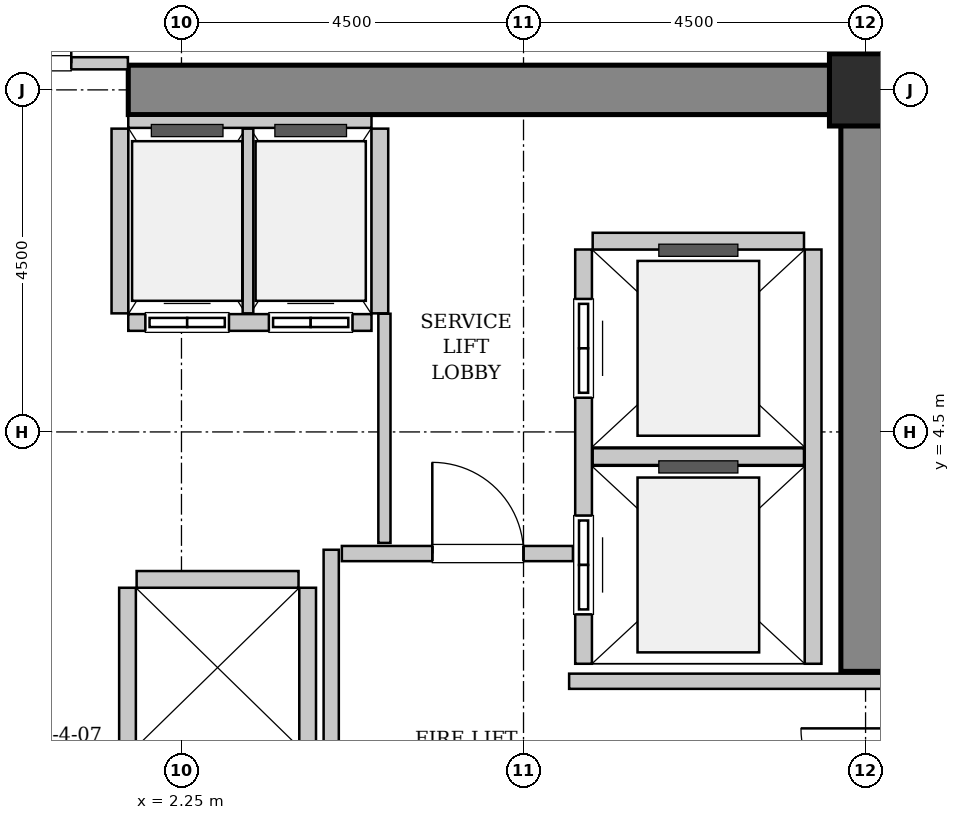
"""IFC4 building model, lengths in metres.
Left out: names, types, materials, properties, quantities, classifications, styles, units other than length and angle.
Written with IfcOpenShell. Run it as: python <this file> out.ifc"""

import sys

from ifc_helpers import new_model, si_unit, direction, frame, frame_2d, origin, origin_2d, place, context, subcontext, project, spatial, rectangle, hollow_rectangle, extrude, source, transform, mapped, element, fill, save


model = new_model("IFC4")
c1 = context("Model", 3, precision=1e-05, world=origin(), true_north=direction((0.0, 1.0)))
c2 = subcontext(c1, "Body", "Model", "MODEL_VIEW")
j1 = project(units=[si_unit("LENGTHUNIT", "METRE"), si_unit("PLANEANGLEUNIT", "RADIAN")], contexts=[c1])
p1 = place(None, origin())
s1 = spatial("IfcSite", under=j1, at=p1, CompositionType="ELEMENT")
p2 = place(p1, origin())
s2 = spatial("IfcBuilding", under=s1, at=p2, CompositionType="ELEMENT")
p3 = place(p2, frame((0.0, 0.0, 59.6)))
s3 = spatial("IfcBuildingStorey", under=s2, at=p3, CompositionType="ELEMENT", Elevation=59.6)
m1 = source(origin(), c2, "Body", "SweptSolid", [
    extrude(rectangle(XDim=10.025, YDim=0.65, at=frame_2d((5.012, 0.0))), origin(), (0.0, 0.0, 1.0), 3.8),
])
p4 = place(p3, frame((1.55, 9.0, 0.0), z_axis=(0.0, 0.0, 1.0), x_axis=(1.0, 0.0, 0.0)))
e1 = element("IfcWall", 1, at=p4, inside=s3, PredefinedType="SHEAR", context=c2, shape_type="MappedRepresentation", body=[
    mapped(m1, transform((0.0, 0.0, 0.0), x_axis=(1.0, 0.0, 0.0), y_axis=(0.0, 1.0, 0.0), z_axis=(0.0, 0.0, 1.0), scale=1.0)),
])
m2 = source(origin(), c2, "Body", "SweptSolid", [
    extrude(rectangle(XDim=7.325, YDim=0.65, at=frame_2d((3.663, 0.0))), origin(), (0.0, 0.0, 1.0), 3.8),
])
p5 = place(p3, frame((11.25, 1.35, 0.0), z_axis=(0.0, 0.0, 1.0), x_axis=(0.0, 1.0, 0.0)))
e2 = element("IfcWall", 2, at=p5, inside=s3, PredefinedType="SHEAR", context=c2, shape_type="MappedRepresentation", body=[
    mapped(m2, transform((0.0, 0.0, 0.0), x_axis=(1.0, 0.0, 0.0), y_axis=(0.0, 1.0, 0.0), z_axis=(0.0, 0.0, 1.0), scale=1.0)),
])
m3 = source(origin(), c2, "Body", "SweptSolid", [
    extrude(hollow_rectangle(XDim=0.95, YDim=0.95, WallThickness=0.045, InnerFilletRadius=0.045, OuterFilletRadius=0.09, at=origin_2d()), origin(), (0.0, 0.0, 1.0), 3.8),
])
p6 = place(p3, frame((11.25, 9.0, 0.0), z_axis=(0.0, 0.0, 1.0), x_axis=(1.0, 0.0, 0.0)))
e3 = element("IfcColumn", 3, at=p6, inside=s3, PredefinedType="COLUMN", context=c2, shape_type="MappedRepresentation", body=[
    mapped(m3, transform((0.0, 0.0, 0.0), x_axis=(1.0, 0.0, 0.0), y_axis=(0.0, 1.0, 0.0), z_axis=(0.0, 0.0, 1.0), scale=1.0)),
])
m4 = source(origin(), c2, "Body", "SweptSolid", [
    extrude(rectangle(XDim=5.45, YDim=0.22, at=frame_2d((2.725, 0.0))), origin(), (0.0, 0.0, 1.0), 3.535),
])
p7 = place(p3, frame((7.54, 6.9, 0.0), z_axis=(0.0, 0.0, 1.0), x_axis=(0.0, -1.0, 0.0)))
e4 = element("IfcWall", 4, at=p7, inside=s3, PredefinedType="SOLIDWALL", context=c2, shape_type="MappedRepresentation", body=[
    mapped(m4, transform((0.0, 0.0, 0.0), x_axis=(1.0, 0.0, 0.0), y_axis=(0.0, 1.0, 0.0), z_axis=(0.0, 0.0, 1.0), scale=1.0)),
])
p8 = place(p7, frame((3.5, 0.0, 0.0)))
e5 = element("IfcOpeningElement", 5, at=p8, cuts=e4, PredefinedType="OPENING", context=c2, shape_type="SweptSolid", body=[
    extrude(rectangle(XDim=1.3, YDim=2.3, at=frame_2d((0.65, 1.15))), frame((0.0, 0.12, 0.0), z_axis=(0.0, -1.0, 0.0), x_axis=(1.0, 0.0, 0.0)), (0.0, 0.0, 1.0), 0.24),
])
p9 = place(p7, frame((0.65, 0.0, 0.0)))
e6 = element("IfcOpeningElement", 6, at=p9, cuts=e4, PredefinedType="OPENING", context=c2, shape_type="SweptSolid", body=[
    extrude(rectangle(XDim=1.3, YDim=2.3, at=frame_2d((0.65, 1.15))), frame((0.0, 0.12, 0.0), z_axis=(0.0, -1.0, 0.0), x_axis=(1.0, 0.0, 0.0)), (0.0, 0.0, 1.0), 0.24),
])
p10 = place(p3, frame((10.56, 1.45, 0.0), z_axis=(0.0, 0.0, 1.0), x_axis=(0.0, 1.0, 0.0)))
e7 = element("IfcWall", 7, at=p10, inside=s3, PredefinedType="SOLIDWALL", context=c2, shape_type="MappedRepresentation", body=[
    mapped(m4, transform((0.0, 0.0, 0.0), x_axis=(1.0, 0.0, 0.0), y_axis=(0.0, 1.0, 0.0), z_axis=(0.0, 0.0, 1.0), scale=1.0)),
])
m5 = source(origin(), c2, "Body", "SweptSolid", [
    extrude(rectangle(XDim=2.78, YDim=0.22, at=frame_2d((1.39, 0.0))), origin(), (0.0, 0.0, 1.0), 3.535),
])
for number, where, z_axis, x_axis in (
    (8, (7.66, 4.175, 0.0), (0.0, 0.0, 1.0), (1.0, 0.0, 0.0)),
    (9, (10.44, 7.01, 0.0), (0.0, 0.0, 1.0), (-1.0, 0.0, 0.0)),
):
    element("IfcWall", number, at=place(p3, frame(where, z_axis=z_axis, x_axis=x_axis)), inside=s3, PredefinedType="SOLIDWALL", context=c2, shape_type="MappedRepresentation", body=[
        mapped(m5, transform((0.0, 0.0, 0.0), x_axis=(1.0, 0.0, 0.0), y_axis=(0.0, 1.0, 0.0), z_axis=(0.0, 0.0, 1.0), scale=1.0)),
    ])
m6 = source(origin(), c2, "Body", "SweptSolid", [
    extrude(rectangle(XDim=3.2, YDim=0.22, at=frame_2d((1.6, 0.0))), origin(), (0.0, 0.0, 1.0), 3.535),
])
p11 = place(p3, frame((1.55, 5.94, 0.0), z_axis=(0.0, 0.0, 1.0), x_axis=(1.0, 0.0, 0.0)))
e10 = element("IfcWall", 10, at=p11, inside=s3, PredefinedType="SOLIDWALL", context=c2, shape_type="MappedRepresentation", body=[
    mapped(m6, transform((0.0, 0.0, 0.0), x_axis=(1.0, 0.0, 0.0), y_axis=(0.0, 1.0, 0.0), z_axis=(0.0, 0.0, 1.0), scale=1.0)),
])
p12 = place(p11, frame((0.225, 0.0, 0.0)))
e11 = element("IfcOpeningElement", 11, at=p12, cuts=e10, PredefinedType="OPENING", context=c2, shape_type="SweptSolid", body=[
    extrude(rectangle(XDim=1.1, YDim=2.2, at=frame_2d((0.55, 1.1))), frame((0.0, 0.12, 0.0), z_axis=(0.0, -1.0, 0.0), x_axis=(1.0, 0.0, 0.0)), (0.0, 0.0, 1.0), 0.24),
])
p13 = place(p11, frame((1.85, 0.0, 0.0)))
e12 = element("IfcOpeningElement", 12, at=p13, cuts=e10, PredefinedType="OPENING", context=c2, shape_type="SweptSolid", body=[
    extrude(rectangle(XDim=1.1, YDim=2.2, at=frame_2d((0.55, 1.1))), frame((0.0, 0.12, 0.0), z_axis=(0.0, -1.0, 0.0), x_axis=(1.0, 0.0, 0.0)), (0.0, 0.0, 1.0), 0.24),
])
m7 = source(origin(), c2, "Body", "SweptSolid", [
    extrude(rectangle(XDim=3.2, YDim=0.16, at=frame_2d((1.6, 0.0))), origin(), (0.0, 0.0, 1.0), 2.425),
])
p14 = place(p3, frame((4.75, 8.58, 0.0), z_axis=(0.0, 0.0, 1.0), x_axis=(-1.0, 0.0, 0.0)))
e13 = element("IfcWall", 13, at=p14, inside=s3, PredefinedType="PARTITIONING", context=c2, shape_type="MappedRepresentation", body=[
    mapped(m7, transform((0.0, 0.0, 0.0), x_axis=(1.0, 0.0, 0.0), y_axis=(0.0, 1.0, 0.0), z_axis=(0.0, 0.0, 1.0), scale=1.0)),
])
m8 = source(origin(), c2, "Body", "SweptSolid", [
    extrude(rectangle(XDim=2.43, YDim=0.22, at=frame_2d((1.215, 0.0))), origin(), (0.0, 0.0, 1.0), 3.535),
])
p15 = place(p3, frame((1.44, 8.49, 0.0), z_axis=(0.0, 0.0, 1.0), x_axis=(0.0, -1.0, 0.0)))
e14 = element("IfcWall", 14, at=p15, inside=s3, PredefinedType="SOLIDWALL", context=c2, shape_type="MappedRepresentation", body=[
    mapped(m8, transform((0.0, 0.0, 0.0), x_axis=(1.0, 0.0, 0.0), y_axis=(0.0, 1.0, 0.0), z_axis=(0.0, 0.0, 1.0), scale=1.0)),
])
m9 = source(origin(), c2, "Body", "SweptSolid", [
    extrude(rectangle(XDim=2.43, YDim=0.14, at=frame_2d((1.215, 0.0))), origin(), (0.0, 0.0, 1.0), 3.535),
])
p16 = place(p3, frame((3.125, 6.06, 0.0), z_axis=(0.0, 0.0, 1.0), x_axis=(0.0, 1.0, 0.0)))
e15 = element("IfcWall", 15, at=p16, inside=s3, PredefinedType="PARTITIONING", context=c2, shape_type="MappedRepresentation", body=[
    mapped(m9, transform((0.0, 0.0, 0.0), x_axis=(1.0, 0.0, 0.0), y_axis=(0.0, 1.0, 0.0), z_axis=(0.0, 0.0, 1.0), scale=1.0)),
])
p17 = place(p3, frame((4.86, 6.06, 0.0), z_axis=(0.0, 0.0, 1.0), x_axis=(0.0, 1.0, 0.0)))
e16 = element("IfcWall", 16, at=p17, inside=s3, PredefinedType="SOLIDWALL", context=c2, shape_type="MappedRepresentation", body=[
    mapped(m8, transform((0.0, 0.0, 0.0), x_axis=(1.0, 0.0, 0.0), y_axis=(0.0, 1.0, 0.0), z_axis=(0.0, 0.0, 1.0), scale=1.0)),
])
m10 = source(origin(), c2, "Body", "SweptSolid", [
    extrude(rectangle(XDim=4.9, YDim=0.22, at=frame_2d((2.45, 0.0))), origin(), (0.0, 0.0, 1.0), 3.535),
])
for number, where, z_axis, x_axis in (
    (17, (1.54, 2.45, 0.0), (0.0, 0.0, 1.0), (0.0, -1.0, 0.0)),
    (18, (3.91, -2.45, 0.0), (0.0, 0.0, 1.0), (0.0, 1.0, 0.0)),
):
    element("IfcWall", number, at=place(p3, frame(where, z_axis=z_axis, x_axis=x_axis)), inside=s3, PredefinedType="SOLIDWALL", context=c2, shape_type="MappedRepresentation", body=[
        mapped(m10, transform((0.0, 0.0, 0.0), x_axis=(1.0, 0.0, 0.0), y_axis=(0.0, 1.0, 0.0), z_axis=(0.0, 0.0, 1.0), scale=1.0)),
    ])
m11 = source(origin(), c2, "Body", "SweptSolid", [
    extrude(rectangle(XDim=2.13, YDim=0.22, at=frame_2d((1.065, 0.0))), origin(), (0.0, 0.0, 1.0), 3.535),
])
p18 = place(p3, frame((3.79, 2.56, 0.0), z_axis=(0.0, 0.0, 1.0), x_axis=(-1.0, 0.0, 0.0)))
e19 = element("IfcWall", 19, at=p18, inside=s3, PredefinedType="SOLIDWALL", context=c2, shape_type="MappedRepresentation", body=[
    mapped(m11, transform((0.0, 0.0, 0.0), x_axis=(1.0, 0.0, 0.0), y_axis=(0.0, 1.0, 0.0), z_axis=(0.0, 0.0, 1.0), scale=1.0)),
])
m12 = source(origin(), c2, "Body", "SweptSolid", [
    extrude(rectangle(XDim=5.9, YDim=0.2, at=frame_2d((2.95, 0.0))), origin(), (0.0, 0.0, 1.0), 3.535),
])
p19 = place(p3, frame((4.22, -2.95, 0.0), z_axis=(0.0, 0.0, 1.0), x_axis=(0.0, 1.0, 0.0)))
e20 = element("IfcWall", 20, at=p19, inside=s3, PredefinedType="PARTITIONING", context=c2, shape_type="MappedRepresentation", body=[
    mapped(m12, transform((0.0, 0.0, 0.0), x_axis=(1.0, 0.0, 0.0), y_axis=(0.0, 1.0, 0.0), z_axis=(0.0, 0.0, 1.0), scale=1.0)),
])
m13 = source(origin(), c2, "Body", "SweptSolid", [
    extrude(rectangle(XDim=3.04, YDim=0.2, at=frame_2d((1.52, 0.0))), origin(), (0.0, 0.0, 1.0), 3.535),
])
p20 = place(p3, frame((4.36, 2.9, 0.0), z_axis=(0.0, 0.0, 1.0), x_axis=(1.0, 0.0, 0.0)))
e21 = element("IfcWall", 21, at=p20, inside=s3, PredefinedType="PARTITIONING", context=c2, shape_type="MappedRepresentation", body=[
    mapped(m13, transform((0.0, 0.0, 0.0), x_axis=(1.0, 0.0, 0.0), y_axis=(0.0, 1.0, 0.0), z_axis=(0.0, 0.0, 1.0), scale=1.0)),
])
p21 = place(p20, frame((1.19, 0.0, 0.0)))
e22 = element("IfcOpeningElement", 22, at=p21, cuts=e21, PredefinedType="OPENING", context=c2, shape_type="SweptSolid", body=[
    extrude(rectangle(XDim=1.2, YDim=2.15, at=frame_2d((0.6, 1.075))), frame((0.0, 0.11, 0.0), z_axis=(0.0, -1.0, 0.0), x_axis=(1.0, 0.0, 0.0)), (0.0, 0.0, 1.0), 0.22),
])
m14 = source(origin(), c2, "Body", "SweptSolid", [
    extrude(rectangle(XDim=4.11, YDim=0.2, at=frame_2d((2.055, 0.0))), origin(), (0.0, 0.0, 1.0), 3.535),
])
p22 = place(p3, frame((7.35, 1.22, 0.0), z_axis=(0.0, 0.0, 1.0), x_axis=(1.0, 0.0, 0.0)))
e23 = element("IfcWall", 23, at=p22, inside=s3, PredefinedType="PARTITIONING", context=c2, shape_type="MappedRepresentation", body=[
    mapped(m14, transform((0.0, 0.0, 0.0), x_axis=(1.0, 0.0, 0.0), y_axis=(0.0, 1.0, 0.0), z_axis=(0.0, 0.0, 1.0), scale=1.0)),
])
m15 = source(origin(), c2, "Body", "SweptSolid", [
    extrude(rectangle(XDim=3.09, YDim=0.16, at=frame_2d((1.545, 0.0))), origin(), (0.0, 0.0, 1.0), 2.425),
])
p23 = place(p3, frame((-1.545, 9.35, 0.0), z_axis=(0.0, 0.0, 1.0), x_axis=(1.0, 0.0, 0.0)))
e24 = element("IfcWall", 24, at=p23, inside=s3, PredefinedType="PARTITIONING", context=c2, shape_type="MappedRepresentation", body=[
    mapped(m15, transform((0.0, 0.0, 0.0), x_axis=(1.0, 0.0, 0.0), y_axis=(0.0, 1.0, 0.0), z_axis=(0.0, 0.0, 1.0), scale=1.0)),
])
p24 = place(p23, frame((0.745, 0.0, 0.0)))
e25 = element("IfcOpeningElement", 25, at=p24, cuts=e24, PredefinedType="OPENING", context=c2, shape_type="SweptSolid", body=[
    extrude(rectangle(XDim=1.6, YDim=2.3, at=frame_2d((0.8, 1.15))), frame((0.0, 0.09, 0.0), z_axis=(0.0, -1.0, 0.0), x_axis=(1.0, 0.0, 0.0)), (0.0, 0.0, 1.0), 0.18),
])
m16 = source(origin(), c2, "Body", "SweptSolid", [
    extrude(rectangle(XDim=3.015, YDim=0.16, at=frame_2d((1.507, 0.0))), origin(), (0.0, 0.0, 1.0), 3.535),
])
p25 = place(p3, frame((4.92, 3.04, 0.0), z_axis=(0.0, 0.0, 1.0), x_axis=(0.0, 1.0, 0.0)))
e26 = element("IfcWall", 26, at=p25, inside=s3, PredefinedType="PARTITIONING", context=c2, shape_type="MappedRepresentation", body=[
    mapped(m16, transform((0.0, 0.0, 0.0), x_axis=(1.0, 0.0, 0.0), y_axis=(0.0, 1.0, 0.0), z_axis=(0.0, 0.0, 1.0), scale=1.0)),
])
m17 = source(origin(), c2, "Body", "SweptSolid", [
    extrude(rectangle(XDim=1.3, YDim=2.3, at=frame_2d((0.65, 1.15))), frame((0.0, 0.025, 0.0), z_axis=(0.0, -1.0, 0.0), x_axis=(1.0, 0.0, 0.0)), (0.0, 0.0, 1.0), 0.05),
])
p26 = place(p8, origin())
e27 = element("IfcDoor", 27, at=p26, inside=s3, OperationType="SLIDING_TO_RIGHT", PredefinedType="DOOR", context=c2, shape_type="MappedRepresentation", body=[
    mapped(m17, transform((0.0, 0.0, 0.0), x_axis=(1.0, 0.0, 0.0), y_axis=(0.0, 1.0, 0.0), z_axis=(0.0, 0.0, 1.0), scale=1.0)),
])
fill(e5, e27)
p27 = place(p9, origin())
e28 = element("IfcDoor", 28, at=p27, inside=s3, OperationType="SLIDING_TO_RIGHT", PredefinedType="DOOR", context=c2, shape_type="MappedRepresentation", body=[
    mapped(m17, transform((0.0, 0.0, 0.0), x_axis=(1.0, 0.0, 0.0), y_axis=(0.0, 1.0, 0.0), z_axis=(0.0, 0.0, 1.0), scale=1.0)),
])
fill(e6, e28)
m18 = source(origin(), c2, "Body", "SweptSolid", [
    extrude(rectangle(XDim=1.1, YDim=2.2, at=frame_2d((0.55, 1.1))), frame((0.0, 0.025, 0.0), z_axis=(0.0, -1.0, 0.0), x_axis=(1.0, 0.0, 0.0)), (0.0, 0.0, 1.0), 0.05),
])
p28 = place(p12, origin())
e29 = element("IfcDoor", 29, at=p28, inside=s3, OperationType="DOUBLE_DOOR_SLIDING", PredefinedType="DOOR", context=c2, shape_type="MappedRepresentation", body=[
    mapped(m18, transform((0.0, 0.0, 0.0), x_axis=(1.0, 0.0, 0.0), y_axis=(0.0, 1.0, 0.0), z_axis=(0.0, 0.0, 1.0), scale=1.0)),
])
fill(e11, e29)
p29 = place(p13, origin())
e30 = element("IfcDoor", 30, at=p29, inside=s3, OperationType="DOUBLE_DOOR_SLIDING", PredefinedType="DOOR", context=c2, shape_type="MappedRepresentation", body=[
    mapped(m18, transform((0.0, 0.0, 0.0), x_axis=(1.0, 0.0, 0.0), y_axis=(0.0, 1.0, 0.0), z_axis=(0.0, 0.0, 1.0), scale=1.0)),
])
fill(e12, e30)
m19 = source(origin(), c2, "Body", "SweptSolid", [
    extrude(rectangle(XDim=1.2, YDim=2.15, at=frame_2d((0.6, 1.075))), frame((0.0, 0.025, 0.0), z_axis=(0.0, -1.0, 0.0), x_axis=(1.0, 0.0, 0.0)), (0.0, 0.0, 1.0), 0.05),
])
p30 = place(p21, origin())
e31 = element("IfcDoor", 31, at=p30, inside=s3, OperationType="SINGLE_SWING_LEFT", PredefinedType="DOOR", context=c2, shape_type="MappedRepresentation", body=[
    mapped(m19, transform((0.0, 0.0, 0.0), x_axis=(1.0, 0.0, 0.0), y_axis=(0.0, 1.0, 0.0), z_axis=(0.0, 0.0, 1.0), scale=1.0)),
])
fill(e22, e31)
m20 = source(origin(), c2, "Body", "SweptSolid", [
    extrude(rectangle(XDim=1.6, YDim=2.3, at=frame_2d((0.8, 1.15))), frame((0.0, 0.025, 0.0), z_axis=(0.0, -1.0, 0.0), x_axis=(1.0, 0.0, 0.0)), (0.0, 0.0, 1.0), 0.05),
])
p31 = place(p24, origin())
e32 = element("IfcDoor", 32, at=p31, inside=s3, OperationType="DOUBLE_DOOR_SINGLE_SWING", PredefinedType="DOOR", context=c2, shape_type="MappedRepresentation", body=[
    mapped(m20, transform((0.0, 0.0, 0.0), x_axis=(1.0, 0.0, 0.0), y_axis=(0.0, 1.0, 0.0), z_axis=(0.0, 0.0, 1.0), scale=1.0)),
])
fill(e25, e32)
save(model, sys.argv[1])
